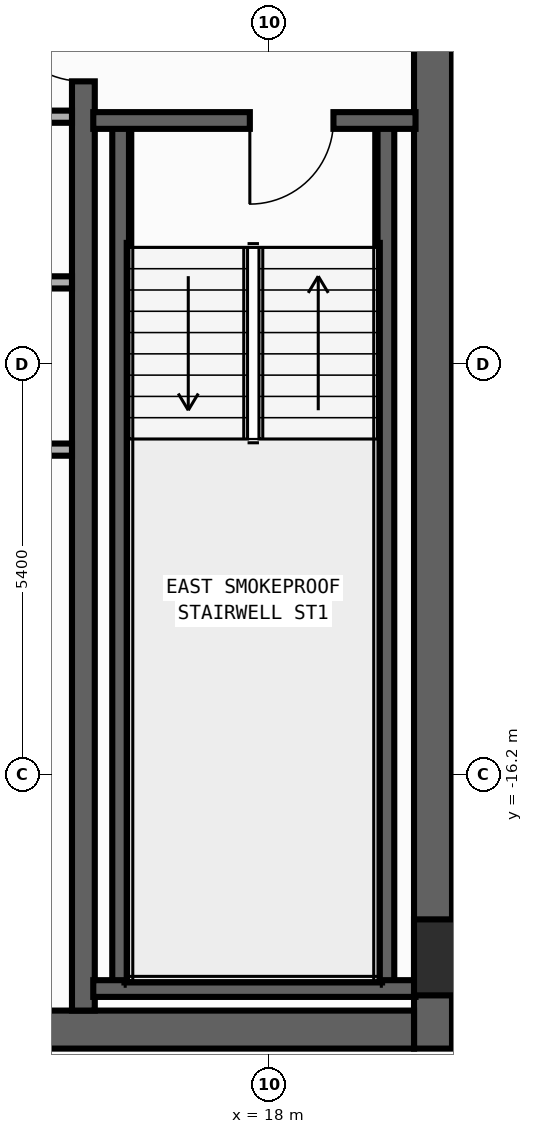
"""IFC4 building model, lengths in metres.
Left out: names, types, materials, properties, quantities, classifications, styles, units other than length and angle.
Written with IfcOpenShell. Run it as: python <this file> out.ifc"""

import sys

from ifc_helpers import new_model, si_unit, direction, frame, frame_2d, origin, origin_2d, place, context, subcontext, project, spatial, rectangle, circle, extrude, element, fill, save


model = new_model("IFC4")
c1 = context("Model", 3, precision=1e-05, world=origin(), true_north=direction((0.0, 1.0)))
c2 = subcontext(c1, "Body", "Model", "MODEL_VIEW")
j1 = project(units=[si_unit("LENGTHUNIT", "METRE"), si_unit("PLANEANGLEUNIT", "RADIAN")], contexts=[c1])
p1 = place(None, origin())
s1 = spatial("IfcSite", under=j1, at=p1, CompositionType="ELEMENT")
p2 = place(p1, origin())
s2 = spatial("IfcBuilding", under=s1, at=p2, CompositionType="ELEMENT")
p3 = place(p2, frame((0.0, 0.0, 308.0)))
s3 = spatial("IfcBuildingStorey", under=s2, at=p3, CompositionType="ELEMENT", Elevation=308.0)
p4 = place(p3, frame((20.15, -19.8, 0.0), z_axis=(0.0, 0.0, 1.0), x_axis=(0.0, 1.0, 0.0)))
e1 = element("IfcWall", 1, at=p4, inside=s3, PredefinedType="SHEAR", context=c2, shape_type="SweptSolid", body=[
    extrude(rectangle(XDim=27.0, YDim=0.5, at=frame_2d((13.5, 0.0))), origin(), (0.0, 0.0, 1.0), 3.54),
])
p5 = place(p3, frame((12.5, -19.55, 0.0), z_axis=(0.0, 0.0, 1.0), x_axis=(1.0, 0.0, 0.0)))
e2 = element("IfcWall", 2, at=p5, inside=s3, PredefinedType="SHEAR", context=c2, shape_type="SweptSolid", body=[
    extrude(rectangle(XDim=7.4, YDim=0.5, at=frame_2d((3.7, 0.0))), origin(), (0.0, 0.0, 1.0), 3.54),
])
p6 = place(p3, frame((15.55, -19.3, 0.0), z_axis=(0.0, 0.0, 1.0), x_axis=(0.0, 1.0, 0.0)))
e3 = element("IfcWall", 3, at=p6, inside=s3, PredefinedType="SHEAR", context=c2, shape_type="SweptSolid", body=[
    extrude(rectangle(XDim=26.0, YDim=0.3, at=frame_2d((13.0, 0.0))), origin(), (0.0, 0.0, 1.0), 3.54),
])
p7 = place(p6, frame((12.225, 0.0, 0.0)))
e4 = element("IfcOpeningElement", 4, at=p7, cuts=e3, PredefinedType="OPENING", context=c2, shape_type="SweptSolid", body=[
    extrude(rectangle(XDim=1.15, YDim=2.2, at=frame_2d((0.575, 1.1))), frame((0.0, 0.16, 0.0), z_axis=(0.0, -1.0, 0.0), x_axis=(1.0, 0.0, 0.0)), (0.0, 0.0, 1.0), 0.32),
])
p8 = place(p6, frame((24.625, 0.0, 0.0)))
e5 = element("IfcOpeningElement", 5, at=p8, cuts=e3, PredefinedType="OPENING", context=c2, shape_type="SweptSolid", body=[
    extrude(rectangle(XDim=0.85, YDim=2.1, at=frame_2d((0.425, 1.05))), frame((0.0, 0.16, 0.0), z_axis=(0.0, -1.0, 0.0), x_axis=(1.0, 0.0, 0.0)), (0.0, 0.0, 1.0), 0.32),
])
for number, where, z_axis, x_axis in (
    (6, (16.04, -19.01, 0.0), (0.0, 0.0, 1.0), (0.0, 1.0, 0.0)),
    (7, (19.53, -19.01, 0.0), (0.0, 0.0, 1.0), (0.0, 1.0, 0.0)),
):
    element("IfcWall", number, at=place(p3, frame(where, z_axis=z_axis, x_axis=x_axis)), inside=s3, PredefinedType="SHEAR", context=c2, shape_type="SweptSolid", body=[
        extrude(rectangle(XDim=11.42, YDim=0.22, at=frame_2d((5.71, 0.0))), origin(), (0.0, 0.0, 1.0), 3.54),
    ])
p9 = place(p3, frame((15.68, -19.01, 0.0), z_axis=(0.0, 0.0, 1.0), x_axis=(1.0, 0.0, 0.0)))
e8 = element("IfcWall", 8, at=p9, inside=s3, PredefinedType="SHEAR", context=c2, shape_type="SweptSolid", body=[
    extrude(rectangle(XDim=4.24, YDim=0.22, at=frame_2d((2.12, 0.0))), origin(), (0.0, 0.0, 1.0), 3.54),
])
p10 = place(p3, frame((19.92, -7.59, 0.0), z_axis=(0.0, 0.0, 1.0), x_axis=(-1.0, 0.0, 0.0)))
e9 = element("IfcWall", 9, at=p10, inside=s3, PredefinedType="SHEAR", context=c2, shape_type="SweptSolid", body=[
    extrude(rectangle(XDim=4.24, YDim=0.22, at=frame_2d((2.12, 0.0))), origin(), (0.0, 0.0, 1.0), 3.54),
])
p11 = place(p10, frame((1.08, 0.0, 0.0)))
e10 = element("IfcOpeningElement", 10, at=p11, cuts=e9, PredefinedType="OPENING", context=c2, shape_type="SweptSolid", body=[
    extrude(rectangle(XDim=1.1, YDim=2.2, at=frame_2d((0.55, 1.1))), frame((0.0, 0.12, 0.0), z_axis=(0.0, -1.0, 0.0), x_axis=(1.0, 0.0, 0.0)), (0.0, 0.0, 1.0), 0.24),
])
p12 = place(p3, frame((20.4, -18.6, 0.0), z_axis=(0.0, 0.0, 1.0), x_axis=(1.0, 0.0, 0.0)))
e11 = element("IfcColumn", 11, at=p12, inside=s3, PredefinedType="COLUMN", context=c2, shape_type="SweptSolid", body=[
    extrude(circle(Radius=0.5, at=origin_2d()), origin(), (0.0, 0.0, 1.0), 3.8),
])
p13 = place(p3, frame((12.8, -7.54, 0.0), z_axis=(0.0, 0.0, 1.0), x_axis=(1.0, 0.0, 0.0)))
e12 = element("IfcWall", 12, at=p13, inside=s3, PredefinedType="STANDARD", context=c2, shape_type="SweptSolid", body=[
    extrude(rectangle(XDim=2.6, YDim=0.16, at=frame_2d((1.3, 0.0))), origin(), (0.0, 0.0, 1.0), 3.54),
])
for number, where, z_axis, x_axis in (
    (13, (12.5, -11.92, 0.0), (0.0, 0.0, 1.0), (1.0, 0.0, 0.0)),
    (14, (12.5, -9.72, 0.0), (0.0, 0.0, 1.0), (1.0, 0.0, 0.0)),
):
    element("IfcWall", number, at=place(p3, frame(where, z_axis=z_axis, x_axis=x_axis)), inside=s3, PredefinedType="PARTITIONING", context=c2, shape_type="SweptSolid", body=[
        extrude(rectangle(XDim=2.9, YDim=0.16, at=frame_2d((1.45, 0.0))), origin(), (0.0, 0.0, 1.0), 3.54),
    ])
p14 = place(p11, origin())
e15 = element("IfcDoor", 15, at=p14, inside=s3, OperationType="SINGLE_SWING_RIGHT", PredefinedType="DOOR", context=c2, shape_type="SweptSolid", body=[
    extrude(rectangle(XDim=1.1, YDim=2.2, at=frame_2d((0.55, 1.1))), frame((0.0, 0.025, 0.0), z_axis=(0.0, -1.0, 0.0), x_axis=(1.0, 0.0, 0.0)), (0.0, 0.0, 1.0), 0.05),
])
fill(e10, e15)
p15 = place(p7, origin())
e16 = element("IfcDoor", 16, at=p15, inside=s3, OperationType="SINGLE_SWING_RIGHT", PredefinedType="DOOR", context=c2, shape_type="SweptSolid", body=[
    extrude(rectangle(XDim=1.15, YDim=2.2, at=frame_2d((0.575, 1.1))), frame((0.0, 0.025, 0.0), z_axis=(0.0, -1.0, 0.0), x_axis=(1.0, 0.0, 0.0)), (0.0, 0.0, 1.0), 0.05),
])
fill(e4, e16)
save(model, sys.argv[1])
